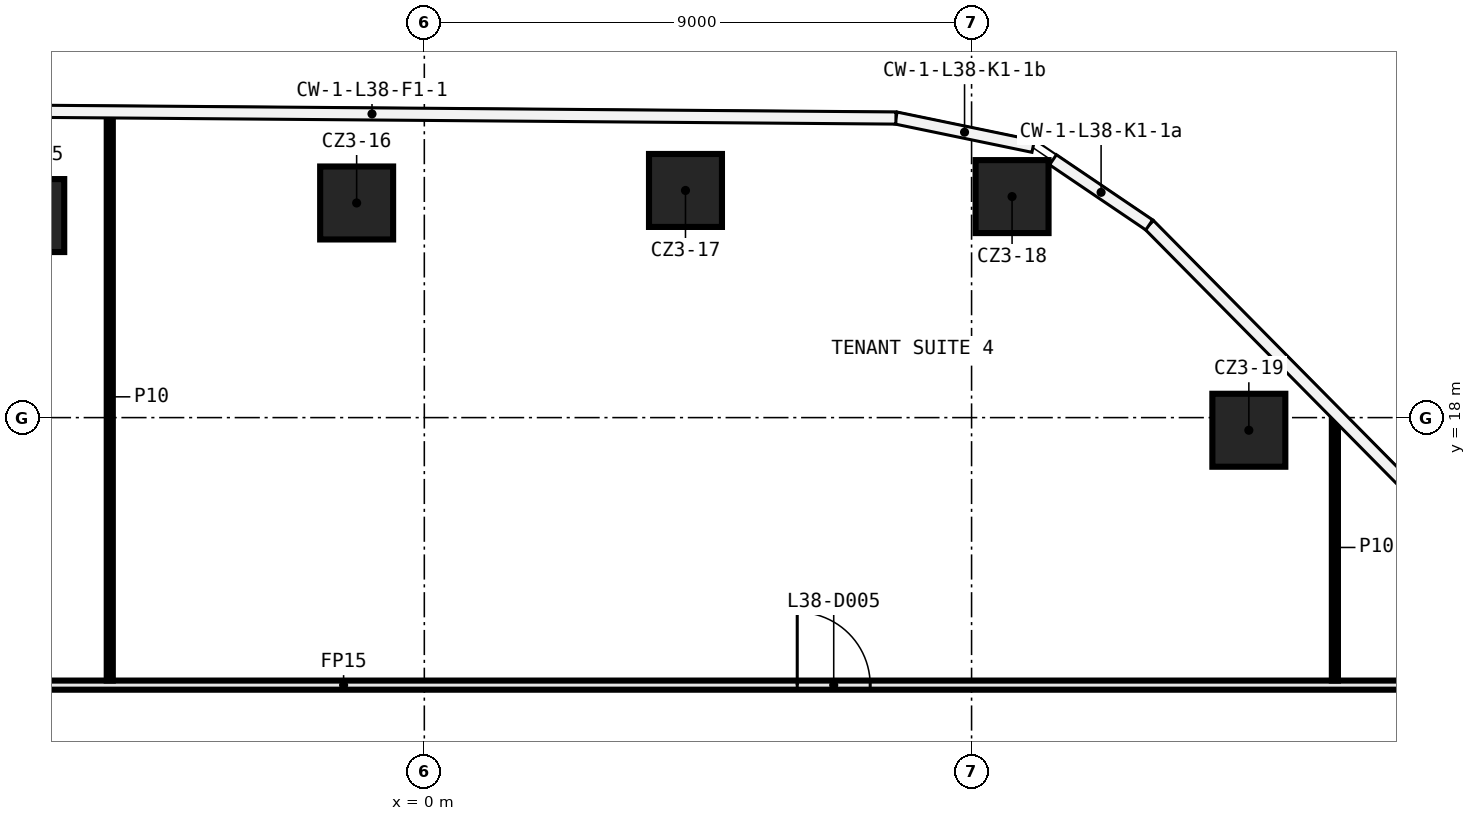
"""IFC4 building model, lengths in metres.
Left out: names, types, materials, properties, quantities, classifications, styles, units other than length and angle.
Written with IfcOpenShell. Run it as: python <this file> out.ifc"""

import sys

from ifc_helpers import new_model, si_unit, direction, frame, frame_2d, origin, origin_2d, place, context, subcontext, project, spatial, rectangle, extrude, element, fill, save


model = new_model("IFC4")
c1 = context("Model", 3, precision=1e-05, world=origin(), true_north=direction((0.0, 1.0)))
c2 = subcontext(c1, "Body", "Model", "MODEL_VIEW")
j1 = project(units=[si_unit("LENGTHUNIT", "METRE"), si_unit("PLANEANGLEUNIT", "RADIAN")], contexts=[c1])
p1 = place(None, origin())
s1 = spatial("IfcSite", under=j1, at=p1, CompositionType="ELEMENT")
p2 = place(p1, origin())
s2 = spatial("IfcBuilding", under=s1, at=p2, CompositionType="ELEMENT")
p3 = place(p2, frame((0.0, 0.0, 175.4)))
s3 = spatial("IfcBuildingStorey", under=s2, at=p3, CompositionType="ELEMENT", Elevation=175.4)
for number, where, z_axis, x_axis in (
    (1, (-6.522, 21.323, 0.0), (0.0, 0.0, 1.0), (1.0, 0.0, 0.0)),
    (2, (-1.113, 21.53, 0.0), (0.0, 0.0, 1.0), (1.0, 0.0, 0.0)),
    (3, (4.295, 21.736, 0.0), (0.0, 0.0, 1.0), (1.0, 0.0, 0.0)),
    (4, (9.666, 21.635, 0.0), (0.0, 0.0, 1.0), (1.0, 0.0, 0.0)),
    (5, (13.56, 17.792, 0.0), (0.0, 0.0, 1.0), (1.0, 0.0, 0.0)),
):
    element("IfcColumn", number, at=place(p3, frame(where, z_axis=z_axis, x_axis=x_axis)), inside=s3, PredefinedType="COLUMN", context=c2, shape_type="SweptSolid", body=[
        extrude(rectangle(XDim=1.2, YDim=1.2, at=origin_2d()), origin(), (0.0, 0.0, 1.0), 3.82),
    ])
p4 = place(p3, frame((-15.842, 13.6, 0.0), z_axis=(0.0, 0.0, 1.0), x_axis=(1.0, 0.0, 0.0)))
e6 = element("IfcWall", 6, at=p4, inside=s3, PredefinedType="PARTITIONING", context=c2, shape_type="SweptSolid", body=[
    extrude(rectangle(XDim=32.502, YDim=0.15, at=frame_2d((16.251, 0.0))), origin(), (0.0, 0.0, 1.0), 3.82),
])
p5 = place(p4, frame((21.974, 0.0, 0.0)))
e7 = element("IfcOpeningElement", 7, at=p5, cuts=e6, PredefinedType="OPENING", context=c2, shape_type="SweptSolid", body=[
    extrude(rectangle(XDim=1.2, YDim=2.1, at=frame_2d((0.6, 1.05))), frame((0.0, 0.085, 0.0), z_axis=(0.0, -1.0, 0.0), x_axis=(1.0, 0.0, 0.0)), (0.0, 0.0, 1.0), 0.17),
])
p6 = place(p4, frame((5.854, 0.0, 0.0)))
e8 = element("IfcOpeningElement", 8, at=p6, cuts=e6, PredefinedType="OPENING", context=c2, shape_type="SweptSolid", body=[
    extrude(rectangle(XDim=1.2, YDim=2.1, at=frame_2d((0.6, 1.05))), frame((0.0, 0.085, 0.0), z_axis=(0.0, -1.0, 0.0), x_axis=(1.0, 0.0, 0.0)), (0.0, 0.0, 1.0), 0.17),
])
p7 = place(p3, frame((14.975, 13.675, 0.0), z_axis=(0.0, 0.0, 1.0), x_axis=(0.0, 1.0, 0.0)))
e9 = element("IfcWall", 9, at=p7, inside=s3, PredefinedType="PARTITIONING", context=c2, shape_type="SweptSolid", body=[
    extrude(rectangle(XDim=4.379, YDim=0.1, at=frame_2d((2.189, 0.0))), origin(), (0.0, 0.0, 1.0), 3.82),
])
p8 = place(p3, frame((-5.173, 13.675, 0.0), z_axis=(0.0, 0.0, 1.0), x_axis=(0.0, 1.0, 0.0)))
e10 = element("IfcWall", 10, at=p8, inside=s3, PredefinedType="PARTITIONING", context=c2, shape_type="SweptSolid", body=[
    extrude(rectangle(XDim=9.333, YDim=0.1, at=frame_2d((4.667, 0.0))), origin(), (0.0, 0.0, 1.0), 3.82),
])
p9 = place(p5, origin())
e11 = element("IfcDoor", 11, at=p9, inside=s3, OperationType="SINGLE_SWING_RIGHT", PredefinedType="DOOR", context=c2, shape_type="SweptSolid", body=[
    extrude(rectangle(XDim=1.2, YDim=2.1, at=frame_2d((0.6, 1.05))), frame((0.0, 0.025, 0.0), z_axis=(0.0, -1.0, 0.0), x_axis=(1.0, 0.0, 0.0)), (0.0, 0.0, 1.0), 0.05),
])
fill(e7, e11)
save(model, sys.argv[1])
